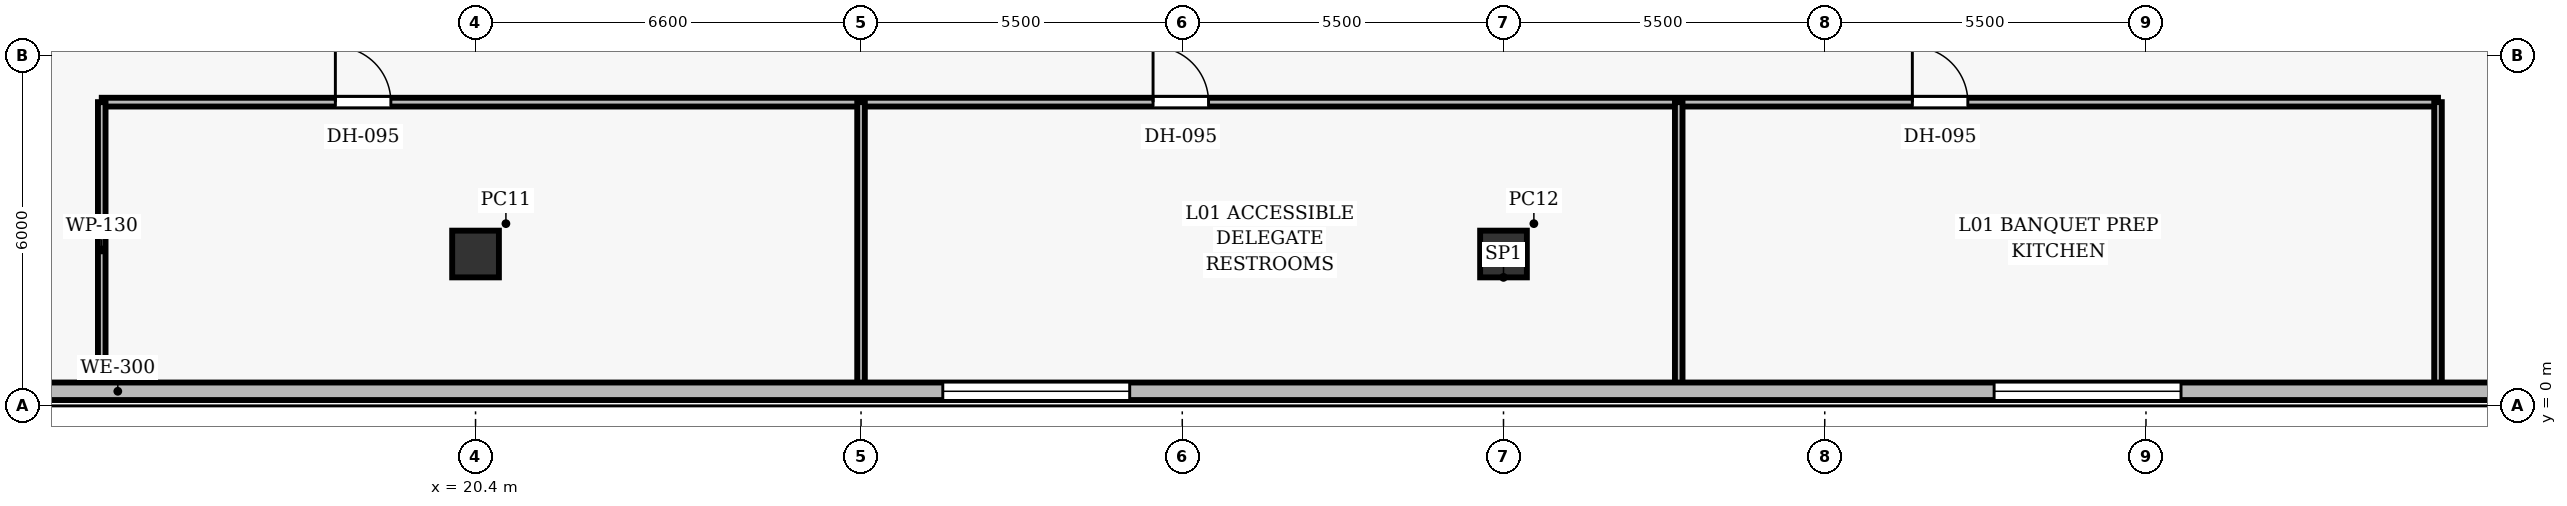
"""IFC4 building model, lengths in metres.
Left out: names, types, materials, properties, quantities, classifications, styles, units other than length and angle.
Written with IfcOpenShell. Run it as: python <this file> out.ifc"""

import sys

from ifc_helpers import new_model, si_unit, direction, frame, frame_2d, origin, origin_2d, place, context, subcontext, project, spatial, rectangle, extrude, element, fill, save


model = new_model("IFC4")
c1 = context("Model", 3, precision=1e-05, world=origin(), true_north=direction((0.0, 1.0)))
c2 = subcontext(c1, "Body", "Model", "MODEL_VIEW")
j1 = project(units=[si_unit("LENGTHUNIT", "METRE"), si_unit("PLANEANGLEUNIT", "RADIAN")], contexts=[c1])
p1 = place(None, origin())
s1 = spatial("IfcSite", under=j1, at=p1, CompositionType="ELEMENT")
p2 = place(p1, origin())
s2 = spatial("IfcBuilding", under=s1, at=p2, CompositionType="ELEMENT")
p3 = place(p2, frame((0.0, 0.0, 6.6)))
s3 = spatial("IfcBuildingStorey", under=s2, at=p3, CompositionType="ELEMENT", Elevation=6.6)
for number, where, z_axis, x_axis in (
    (1, (20.4, 2.6, 0.0), (0.0, 0.0, 1.0), (1.0, 0.0, 0.0)),
    (2, (38.0, 2.6, 0.0), (0.0, 0.0, 1.0), (1.0, 0.0, 0.0)),
):
    element("IfcColumn", number, at=place(p3, frame(where, z_axis=z_axis, x_axis=x_axis)), inside=s3, PredefinedType="COLUMN", context=c2, shape_type="SweptSolid", body=[
        extrude(rectangle(XDim=0.8, YDim=0.8, at=origin_2d()), origin(), (0.0, 0.0, 1.0), 5.4),
    ])
p4 = place(p3, frame((14.0, 5.2, 0.0), z_axis=(0.0, 0.0, 1.0), x_axis=(1.0, 0.0, 0.0)))
e3 = element("IfcWall", 3, at=p4, inside=s3, PredefinedType="PARTITIONING", context=c2, shape_type="SweptSolid", body=[
    extrude(rectangle(XDim=40.0, YDim=0.15, at=frame_2d((20.0, 0.0))), origin(), (0.0, 0.0, 1.0), 4.11),
])
p5 = place(p4, frame((4.0, 0.0, 0.0)))
e4 = element("IfcOpeningElement", 4, at=p5, cuts=e3, PredefinedType="OPENING", context=c2, shape_type="SweptSolid", body=[
    extrude(rectangle(XDim=0.95, YDim=2.15, at=frame_2d((0.475, 1.075))), frame((0.0, 0.085, 0.0), z_axis=(0.0, -1.0, 0.0), x_axis=(1.0, 0.0, 0.0)), (0.0, 0.0, 1.0), 0.17),
])
p6 = place(p4, frame((18.0, 0.0, 0.0)))
e5 = element("IfcOpeningElement", 5, at=p6, cuts=e3, PredefinedType="OPENING", context=c2, shape_type="SweptSolid", body=[
    extrude(rectangle(XDim=0.95, YDim=2.15, at=frame_2d((0.475, 1.075))), frame((0.0, 0.085, 0.0), z_axis=(0.0, -1.0, 0.0), x_axis=(1.0, 0.0, 0.0)), (0.0, 0.0, 1.0), 0.17),
])
p7 = place(p4, frame((31.0, 0.0, 0.0)))
e6 = element("IfcOpeningElement", 6, at=p7, cuts=e3, PredefinedType="OPENING", context=c2, shape_type="SweptSolid", body=[
    extrude(rectangle(XDim=0.95, YDim=2.15, at=frame_2d((0.475, 1.075))), frame((0.0, 0.085, 0.0), z_axis=(0.0, -1.0, 0.0), x_axis=(1.0, 0.0, 0.0)), (0.0, 0.0, 1.0), 0.17),
])
for number, where, z_axis, x_axis in (
    (7, (14.0, 0.14, 0.0), (0.0, 0.0, 1.0), (0.0, 1.0, 0.0)),
    (8, (27.0, 0.14, 0.0), (0.0, 0.0, 1.0), (0.0, 1.0, 0.0)),
    (9, (41.0, 0.14, 0.0), (0.0, 0.0, 1.0), (0.0, 1.0, 0.0)),
    (10, (54.0, 0.14, 0.0), (0.0, 0.0, 1.0), (0.0, 1.0, 0.0)),
):
    element("IfcWall", number, at=place(p3, frame(where, z_axis=z_axis, x_axis=x_axis)), inside=s3, PredefinedType="PARTITIONING", context=c2, shape_type="SweptSolid", body=[
        extrude(rectangle(XDim=5.06, YDim=0.13, at=frame_2d((2.53, 0.0))), origin(), (0.0, 0.0, 1.0), 4.11),
    ])
p8 = place(p3, frame((75.6, 0.25, 0.0), z_axis=(0.0, 0.0, 1.0), x_axis=(-1.0, 0.0, 0.0)))
e11 = element("IfcWall", 11, at=p8, inside=s3, PredefinedType="SOLIDWALL", context=c2, shape_type="SweptSolid", body=[
    extrude(rectangle(XDim=75.2, YDim=0.3, at=frame_2d((37.6, 0.0))), origin(), (0.0, 0.0, 1.0), 4.56),
])
p9 = place(p8, frame((10.0, 0.0, 0.95)))
e12 = element("IfcOpeningElement", 12, at=p9, cuts=e11, PredefinedType="OPENING", context=c2, shape_type="SweptSolid", body=[
    extrude(rectangle(XDim=3.2, YDim=2.6, at=frame_2d((1.6, 1.3))), frame((0.0, 0.16, 0.0), z_axis=(0.0, -1.0, 0.0), x_axis=(1.0, 0.0, 0.0)), (0.0, 0.0, 1.0), 0.32),
])
p10 = place(p8, frame((26.0, 0.0, 0.95)))
e13 = element("IfcOpeningElement", 13, at=p10, cuts=e11, PredefinedType="OPENING", context=c2, shape_type="SweptSolid", body=[
    extrude(rectangle(XDim=3.2, YDim=2.6, at=frame_2d((1.6, 1.3))), frame((0.0, 0.16, 0.0), z_axis=(0.0, -1.0, 0.0), x_axis=(1.0, 0.0, 0.0)), (0.0, 0.0, 1.0), 0.32),
])
p11 = place(p8, frame((44.0, 0.0, 0.95)))
e14 = element("IfcOpeningElement", 14, at=p11, cuts=e11, PredefinedType="OPENING", context=c2, shape_type="SweptSolid", body=[
    extrude(rectangle(XDim=3.2, YDim=2.6, at=frame_2d((1.6, 1.3))), frame((0.0, 0.16, 0.0), z_axis=(0.0, -1.0, 0.0), x_axis=(1.0, 0.0, 0.0)), (0.0, 0.0, 1.0), 0.32),
])
p12 = place(p5, origin())
e15 = element("IfcDoor", 15, at=p12, inside=s3, OperationType="SINGLE_SWING_LEFT", PredefinedType="DOOR", context=c2, shape_type="SweptSolid", body=[
    extrude(rectangle(XDim=0.95, YDim=2.15, at=frame_2d((0.475, 1.075))), frame((0.0, 0.025, 0.0), z_axis=(0.0, -1.0, 0.0), x_axis=(1.0, 0.0, 0.0)), (0.0, 0.0, 1.0), 0.05),
])
fill(e4, e15)
p13 = place(p6, origin())
e16 = element("IfcDoor", 16, at=p13, inside=s3, OperationType="SINGLE_SWING_LEFT", PredefinedType="DOOR", context=c2, shape_type="SweptSolid", body=[
    extrude(rectangle(XDim=0.95, YDim=2.15, at=frame_2d((0.475, 1.075))), frame((0.0, 0.025, 0.0), z_axis=(0.0, -1.0, 0.0), x_axis=(1.0, 0.0, 0.0)), (0.0, 0.0, 1.0), 0.05),
])
fill(e5, e16)
p14 = place(p7, origin())
e17 = element("IfcDoor", 17, at=p14, inside=s3, OperationType="SINGLE_SWING_LEFT", PredefinedType="DOOR", context=c2, shape_type="SweptSolid", body=[
    extrude(rectangle(XDim=0.95, YDim=2.15, at=frame_2d((0.475, 1.075))), frame((0.0, 0.025, 0.0), z_axis=(0.0, -1.0, 0.0), x_axis=(1.0, 0.0, 0.0)), (0.0, 0.0, 1.0), 0.05),
])
fill(e6, e17)
p15 = place(p10, origin())
e18 = element("IfcWindow", 18, at=p15, inside=s3, PartitioningType="SINGLE_PANEL", PredefinedType="WINDOW", context=c2, shape_type="SweptSolid", body=[
    extrude(rectangle(XDim=3.2, YDim=2.6, at=frame_2d((1.6, 1.3))), frame((0.0, 0.03, 0.0), z_axis=(0.0, -1.0, 0.0), x_axis=(1.0, 0.0, 0.0)), (0.0, 0.0, 1.0), 0.06),
])
fill(e13, e18)
p16 = place(p11, origin())
e19 = element("IfcWindow", 19, at=p16, inside=s3, PartitioningType="SINGLE_PANEL", PredefinedType="WINDOW", context=c2, shape_type="SweptSolid", body=[
    extrude(rectangle(XDim=3.2, YDim=2.6, at=frame_2d((1.6, 1.3))), frame((0.0, 0.03, 0.0), z_axis=(0.0, -1.0, 0.0), x_axis=(1.0, 0.0, 0.0)), (0.0, 0.0, 1.0), 0.06),
])
fill(e14, e19)
save(model, sys.argv[1])
